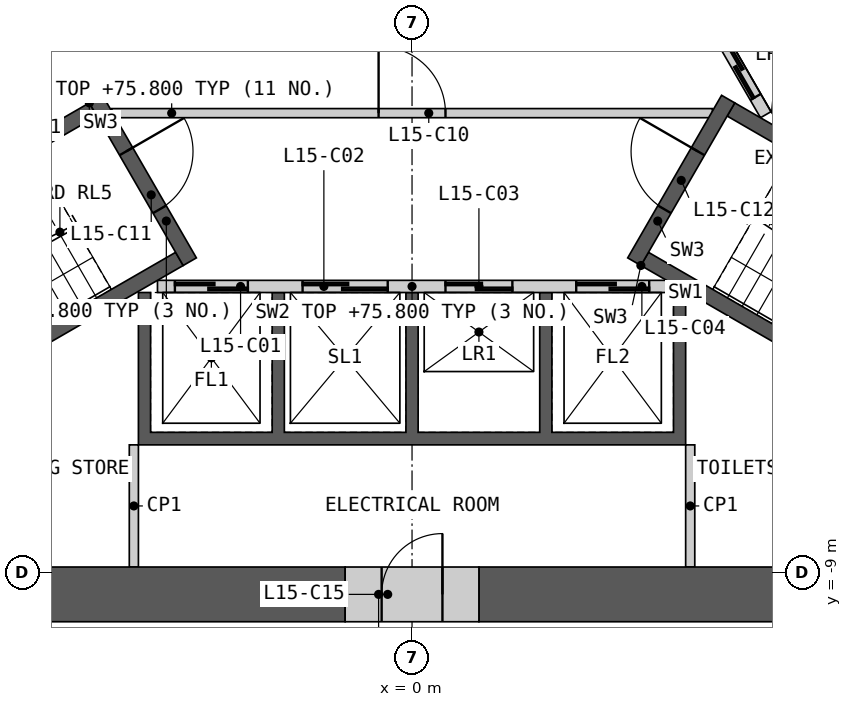
"""IFC4 building model, lengths in metres.
Left out: names, types, materials, properties, quantities, classifications, styles, units other than length and angle.
Written with IfcOpenShell. Run it as: python <this file> out.ifc"""

import sys

from ifc_helpers import new_model, si_unit, direction, frame, frame_2d, origin, place, context, subcontext, project, spatial, polyline, rectangle, outline, extrude, element, fill, save


model = new_model("IFC4")
c1 = context("Model", 3, precision=1e-05, world=origin(), true_north=direction((0.0, 1.0)))
c2 = subcontext(c1, "Body", "Model", "MODEL_VIEW")
j1 = project(units=[si_unit("LENGTHUNIT", "METRE"), si_unit("PLANEANGLEUNIT", "RADIAN")], contexts=[c1])
p1 = place(None, origin())
s1 = spatial("IfcSite", under=j1, at=p1, CompositionType="ELEMENT")
p2 = place(p1, origin())
s2 = spatial("IfcBuilding", under=s1, at=p2, CompositionType="ELEMENT")
p3 = place(p2, frame((0.0, 0.0, 72.0)))
s3 = spatial("IfcBuildingStorey", under=s2, at=p3, CompositionType="ELEMENT", Elevation=72.0)
p4 = place(p3, origin())
e1 = element("IfcWall", 1, at=p4, inside=s3, PredefinedType="SHEAR", context=c2, shape_type="SweptSolid", body=[
    extrude(outline(polyline([(4.5, -4.4), (4.5, -6.906), (-4.5, -6.906), (-4.5, -4.4), (-4.3, -4.4), (-4.3, -6.7), (-2.3, -6.7), (-2.3, -4.4), (-2.1, -4.4), (-2.1, -6.7), (-0.1, -6.7), (-0.1, -4.4), (0.1, -4.4), (0.1, -6.7), (2.1, -6.7), (2.1, -4.4), (2.3, -4.4), (2.3, -6.7), (4.3, -6.7), (4.3, -4.4), (4.5, -4.4)])), origin(), (0.0, 0.0, 1.0), 3.8),
])
p5 = place(p3, frame((-4.187, -4.3, 0.0), z_axis=(0.0, 0.0, 1.0), x_axis=(1.0, 0.0, 0.0)))
e2 = element("IfcWall", 2, at=p5, inside=s3, PredefinedType="SOLIDWALL", context=c2, shape_type="SweptSolid", body=[
    extrude(rectangle(XDim=8.373, YDim=0.2, at=frame_2d((4.187, 0.0))), origin(), (0.0, 0.0, 1.0), 3.8),
])
p6 = place(p5, frame((0.287, 0.0, 0.0)))
e3 = element("IfcOpeningElement", 3, at=p6, cuts=e2, PredefinedType="OPENING", context=c2, shape_type="SweptSolid", body=[
    extrude(rectangle(XDim=1.2, YDim=2.1, at=frame_2d((0.6, 1.05))), frame((0.0, 0.11, 0.0), z_axis=(0.0, -1.0, 0.0), x_axis=(1.0, 0.0, 0.0)), (0.0, 0.0, 1.0), 0.22),
])
p7 = place(p5, frame((2.387, 0.0, 0.0)))
e4 = element("IfcOpeningElement", 4, at=p7, cuts=e2, PredefinedType="OPENING", context=c2, shape_type="SweptSolid", body=[
    extrude(rectangle(XDim=1.4, YDim=2.1, at=frame_2d((0.7, 1.05))), frame((0.0, 0.11, 0.0), z_axis=(0.0, -1.0, 0.0), x_axis=(1.0, 0.0, 0.0)), (0.0, 0.0, 1.0), 0.22),
])
p8 = place(p5, frame((4.737, 0.0, 0.0)))
e5 = element("IfcOpeningElement", 5, at=p8, cuts=e2, PredefinedType="OPENING", context=c2, shape_type="SweptSolid", body=[
    extrude(rectangle(XDim=1.1, YDim=2.1, at=frame_2d((0.55, 1.05))), frame((0.0, 0.11, 0.0), z_axis=(0.0, -1.0, 0.0), x_axis=(1.0, 0.0, 0.0)), (0.0, 0.0, 1.0), 0.22),
])
p9 = place(p5, frame((6.887, 0.0, 0.0)))
e6 = element("IfcOpeningElement", 6, at=p9, cuts=e2, PredefinedType="OPENING", context=c2, shape_type="SweptSolid", body=[
    extrude(rectangle(XDim=1.2, YDim=2.1, at=frame_2d((0.6, 1.05))), frame((0.0, 0.11, 0.0), z_axis=(0.0, -1.0, 0.0), x_axis=(1.0, 0.0, 0.0)), (0.0, 0.0, 1.0), 0.22),
])
p10 = place(p3, origin())
e7 = element("IfcWall", 7, at=p10, inside=s3, PredefinedType="SHEAR", context=c2, shape_type="SweptSolid", body=[
    extrude(outline(polyline([(2.66, 4.192), (4.831, 5.445), (8.231, -0.444), (6.061, -1.697), (5.96, -1.524), (7.952, -0.374), (6.952, 1.358), (4.96, 0.208), (4.861, 0.381), (6.852, 1.531), (5.852, 3.263), (3.861, 2.113), (3.76, 2.287), (5.752, 3.437), (4.752, 5.169), (2.76, 4.019), (2.66, 4.192)])), origin(), (0.0, 0.0, 1.0), 3.8),
])
p11 = place(p3, frame((5.817, -1.476, 0.0), z_axis=(0.0, 0.0, 1.0), x_axis=(-0.500002616675, 0.866023893041, 0.0)))
e8 = element("IfcWall", 8, at=p11, inside=s3, PredefinedType="SOLIDWALL", context=c2, shape_type="SweptSolid", body=[
    extrude(rectangle(XDim=8.373, YDim=0.2, at=frame_2d((4.187, 0.0))), origin(), (0.0, 0.0, 1.0), 3.8),
])
p12 = place(p11, frame((0.337, 0.0, 0.0)))
e9 = element("IfcOpeningElement", 9, at=p12, cuts=e8, PredefinedType="OPENING", context=c2, shape_type="SweptSolid", body=[
    extrude(rectangle(XDim=1.1, YDim=2.1, at=frame_2d((0.55, 1.05))), frame((0.0, 0.11, 0.0), z_axis=(0.0, -1.0, 0.0), x_axis=(1.0, 0.0, 0.0)), (0.0, 0.0, 1.0), 0.22),
])
p13 = place(p11, frame((2.537, 0.0, 0.0)))
e10 = element("IfcOpeningElement", 10, at=p13, cuts=e8, PredefinedType="OPENING", context=c2, shape_type="SweptSolid", body=[
    extrude(rectangle(XDim=1.1, YDim=2.1, at=frame_2d((0.55, 1.05))), frame((0.0, 0.11, 0.0), z_axis=(0.0, -1.0, 0.0), x_axis=(1.0, 0.0, 0.0)), (0.0, 0.0, 1.0), 0.22),
])
p14 = place(p11, frame((4.737, 0.0, 0.0)))
e11 = element("IfcOpeningElement", 11, at=p14, cuts=e8, PredefinedType="OPENING", context=c2, shape_type="SweptSolid", body=[
    extrude(rectangle(XDim=1.1, YDim=2.1, at=frame_2d((0.55, 1.05))), frame((0.0, 0.11, 0.0), z_axis=(0.0, -1.0, 0.0), x_axis=(1.0, 0.0, 0.0)), (0.0, 0.0, 1.0), 0.22),
])
p15 = place(p11, frame((7.037, 0.0, 0.0)))
e12 = element("IfcOpeningElement", 12, at=p15, cuts=e8, PredefinedType="OPENING", context=c2, shape_type="SweptSolid", body=[
    extrude(rectangle(XDim=0.9, YDim=2.1, at=frame_2d((0.45, 1.05))), frame((0.0, 0.11, 0.0), z_axis=(0.0, -1.0, 0.0), x_axis=(1.0, 0.0, 0.0)), (0.0, 0.0, 1.0), 0.22),
])
p16 = place(p3, frame((-4.941, -1.45, 0.0), z_axis=(0.0, 0.0, 1.0), x_axis=(1.0, 0.0, 0.0)))
e13 = element("IfcWall", 13, at=p16, inside=s3, PredefinedType="PARTITIONING", context=c2, shape_type="SweptSolid", body=[
    extrude(rectangle(XDim=9.882, YDim=0.15, at=frame_2d((4.941, 0.0))), origin(), (0.0, 0.0, 1.0), 3.8),
])
p17 = place(p16, frame((4.391, 0.0, 0.0)))
e14 = element("IfcOpeningElement", 14, at=p17, cuts=e13, PredefinedType="OPENING", context=c2, shape_type="SweptSolid", body=[
    extrude(rectangle(XDim=1.1, YDim=2.1, at=frame_2d((0.55, 1.05))), frame((0.0, 0.085, 0.0), z_axis=(0.0, -1.0, 0.0), x_axis=(1.0, 0.0, 0.0)), (0.0, 0.0, 1.0), 0.17),
])
p18 = place(p3, origin())
e15 = element("IfcWall", 15, at=p18, inside=s3, PredefinedType="SHEAR", context=c2, shape_type="SweptSolid", body=[
    extrude(outline(polyline([(-5.307, -1.281), (-10.374, -4.206), (-10.032, -4.298), (-5.182, -1.498), (-5.307, -1.281)])), origin(), (0.0, 0.0, 1.0), 3.8),
])
p19 = place(p3, origin())
e16 = element("IfcWall", 16, at=p19, inside=s3, PredefinedType="SHEAR", context=c2, shape_type="SweptSolid", body=[
    extrude(outline(polyline([(-8.738, -6.539), (-8.83, -6.881), (-3.763, -3.956), (-3.888, -3.739), (-8.738, -6.539)])), origin(), (0.0, 0.0, 1.0), 3.8),
])
p20 = place(p3, frame((-5.199, -1.219, 0.0), z_axis=(0.0, 0.0, 1.0), x_axis=(0.499982516597, -0.866035497597, 0.0)))
e17 = element("IfcWall", 17, at=p20, inside=s3, PredefinedType="SHEAR", context=c2, shape_type="SweptSolid", body=[
    extrude(rectangle(XDim=3.088, YDim=0.25, at=frame_2d((1.544, 0.0))), origin(), (0.0, 0.0, 1.0), 3.8),
])
p21 = place(p20, frame((0.994, 0.0, 0.0)))
e18 = element("IfcOpeningElement", 18, at=p21, cuts=e17, PredefinedType="OPENING", context=c2, shape_type="SweptSolid", body=[
    extrude(rectangle(XDim=1.1, YDim=2.1, at=frame_2d((0.55, 1.05))), frame((0.0, 0.135, 0.0), z_axis=(0.0, -1.0, 0.0), x_axis=(1.0, 0.0, 0.0)), (0.0, 0.0, 1.0), 0.27),
])
p22 = place(p3, origin())
e19 = element("IfcWall", 19, at=p22, inside=s3, PredefinedType="SHEAR", context=c2, shape_type="SweptSolid", body=[
    extrude(outline(polyline([(3.763, -3.956), (8.83, -6.881), (8.738, -6.539), (3.888, -3.739), (3.763, -3.956)])), origin(), (0.0, 0.0, 1.0), 3.8),
])
p23 = place(p3, origin())
e20 = element("IfcWall", 20, at=p23, inside=s3, PredefinedType="SHEAR", context=c2, shape_type="SweptSolid", body=[
    extrude(outline(polyline([(10.032, -4.298), (10.374, -4.206), (5.307, -1.281), (5.182, -1.498), (10.032, -4.298)])), origin(), (0.0, 0.0, 1.0), 3.8),
])
p24 = place(p3, frame((3.655, -3.893, 0.0), z_axis=(0.0, 0.0, 1.0), x_axis=(0.499982516597, 0.866035497597, 0.0)))
e21 = element("IfcWall", 21, at=p24, inside=s3, PredefinedType="SHEAR", context=c2, shape_type="SweptSolid", body=[
    extrude(rectangle(XDim=3.088, YDim=0.25, at=frame_2d((1.544, 0.0))), origin(), (0.0, 0.0, 1.0), 3.8),
])
p25 = place(p24, frame((0.994, 0.0, 0.0)))
e22 = element("IfcOpeningElement", 22, at=p25, cuts=e21, PredefinedType="OPENING", context=c2, shape_type="SweptSolid", body=[
    extrude(rectangle(XDim=1.1, YDim=2.1, at=frame_2d((0.55, 1.05))), frame((0.0, 0.135, 0.0), z_axis=(0.0, -1.0, 0.0), x_axis=(1.0, 0.0, 0.0)), (0.0, 0.0, 1.0), 0.27),
])
for number, where, z_axis, x_axis in (
    (23, (4.575, -6.906, 0.0), (0.0, 0.0, 1.0), (0.0, -1.0, 0.0)),
    (24, (-4.575, -6.906, 0.0), (0.0, 0.0, 1.0), (0.0, -1.0, 0.0)),
):
    element("IfcWall", number, at=place(p3, frame(where, z_axis=z_axis, x_axis=x_axis)), inside=s3, PredefinedType="PARTITIONING", context=c2, shape_type="SweptSolid", body=[
        extrude(rectangle(XDim=2.009, YDim=0.15, at=frame_2d((1.004, 0.0))), origin(), (0.0, 0.0, 1.0), 3.8),
    ])
p26 = place(p3, frame((-11.179, -9.365, 0.0), z_axis=(0.0, 0.0, 1.0), x_axis=(1.0, 0.0, 0.0)))
e25 = element("IfcWall", 25, at=p26, inside=s3, PredefinedType="SHEAR", context=c2, shape_type="SweptSolid", body=[
    extrude(rectangle(XDim=10.079, YDim=0.9, at=frame_2d((5.04, 0.0))), origin(), (0.0, 0.0, 1.0), 3.8),
])
p27 = place(p3, frame((1.1, -9.365, 0.0), z_axis=(0.0, 0.0, 1.0), x_axis=(1.0, 0.0, 0.0)))
e26 = element("IfcWall", 26, at=p27, inside=s3, PredefinedType="SHEAR", context=c2, shape_type="SweptSolid", body=[
    extrude(rectangle(XDim=6.189, YDim=0.9, at=frame_2d((3.095, 0.0))), origin(), (0.0, 0.0, 1.0), 3.8),
])
p28 = place(p3, frame((-1.1, -9.365, 0.0), z_axis=(0.0, 0.0, 1.0), x_axis=(1.0, 0.0, 0.0)))
e27 = element("IfcWall", 27, at=p28, inside=s3, PredefinedType="SHEAR", context=c2, shape_type="SweptSolid", body=[
    extrude(rectangle(XDim=2.2, YDim=0.9, at=frame_2d((1.1, 0.0))), origin(), (0.0, 0.0, 1.0), 3.8),
])
p29 = place(p28, frame((0.6, 0.0, 0.0)))
e28 = element("IfcOpeningElement", 28, at=p29, cuts=e27, PredefinedType="OPENING", context=c2, shape_type="SweptSolid", body=[
    extrude(rectangle(XDim=1.0, YDim=2.1, at=frame_2d((0.5, 1.05))), frame((0.0, 0.46, 0.0), z_axis=(0.0, -1.0, 0.0), x_axis=(1.0, 0.0, 0.0)), (0.0, 0.0, 1.0), 0.92),
])
p30 = place(p6, origin())
e29 = element("IfcDoor", 29, at=p30, inside=s3, OperationType="SLIDING_TO_LEFT", PredefinedType="DOOR", context=c2, shape_type="SweptSolid", body=[
    extrude(rectangle(XDim=1.2, YDim=2.1, at=frame_2d((0.6, 1.05))), frame((0.0, 0.025, 0.0), z_axis=(0.0, -1.0, 0.0), x_axis=(1.0, 0.0, 0.0)), (0.0, 0.0, 1.0), 0.05),
])
fill(e3, e29)
p31 = place(p7, origin())
e30 = element("IfcDoor", 30, at=p31, inside=s3, OperationType="SLIDING_TO_LEFT", PredefinedType="DOOR", context=c2, shape_type="SweptSolid", body=[
    extrude(rectangle(XDim=1.4, YDim=2.1, at=frame_2d((0.7, 1.05))), frame((0.0, 0.025, 0.0), z_axis=(0.0, -1.0, 0.0), x_axis=(1.0, 0.0, 0.0)), (0.0, 0.0, 1.0), 0.05),
])
fill(e4, e30)
p32 = place(p8, origin())
e31 = element("IfcDoor", 31, at=p32, inside=s3, OperationType="SLIDING_TO_LEFT", PredefinedType="DOOR", context=c2, shape_type="SweptSolid", body=[
    extrude(rectangle(XDim=1.1, YDim=2.1, at=frame_2d((0.55, 1.05))), frame((0.0, 0.025, 0.0), z_axis=(0.0, -1.0, 0.0), x_axis=(1.0, 0.0, 0.0)), (0.0, 0.0, 1.0), 0.05),
])
fill(e5, e31)
p33 = place(p9, origin())
e32 = element("IfcDoor", 32, at=p33, inside=s3, OperationType="SLIDING_TO_LEFT", PredefinedType="DOOR", context=c2, shape_type="SweptSolid", body=[
    extrude(rectangle(XDim=1.2, YDim=2.1, at=frame_2d((0.6, 1.05))), frame((0.0, 0.025, 0.0), z_axis=(0.0, -1.0, 0.0), x_axis=(1.0, 0.0, 0.0)), (0.0, 0.0, 1.0), 0.05),
])
fill(e6, e32)
p34 = place(p12, origin())
e33 = element("IfcDoor", 33, at=p34, inside=s3, OperationType="SLIDING_TO_LEFT", PredefinedType="DOOR", context=c2, shape_type="SweptSolid", body=[
    extrude(rectangle(XDim=1.1, YDim=2.1, at=frame_2d((0.55, 1.05))), frame((0.0, 0.025, 0.0), z_axis=(0.0, -1.0, 0.0), x_axis=(1.0, 0.0, 0.0)), (0.0, 0.0, 1.0), 0.05),
])
fill(e9, e33)
p35 = place(p17, origin())
e34 = element("IfcDoor", 34, at=p35, inside=s3, OperationType="SINGLE_SWING_LEFT", PredefinedType="DOOR", context=c2, shape_type="SweptSolid", body=[
    extrude(rectangle(XDim=1.1, YDim=2.1, at=frame_2d((0.55, 1.05))), frame((0.0, 0.025, 0.0), z_axis=(0.0, -1.0, 0.0), x_axis=(1.0, 0.0, 0.0)), (0.0, 0.0, 1.0), 0.05),
])
fill(e14, e34)
p36 = place(p21, origin())
e35 = element("IfcDoor", 35, at=p36, inside=s3, OperationType="SINGLE_SWING_LEFT", PredefinedType="DOOR", context=c2, shape_type="SweptSolid", body=[
    extrude(rectangle(XDim=1.1, YDim=2.1, at=frame_2d((0.55, 1.05))), frame((0.0, 0.025, 0.0), z_axis=(0.0, -1.0, 0.0), x_axis=(1.0, 0.0, 0.0)), (0.0, 0.0, 1.0), 0.05),
])
fill(e18, e35)
p37 = place(p25, origin())
e36 = element("IfcDoor", 36, at=p37, inside=s3, OperationType="SINGLE_SWING_RIGHT", PredefinedType="DOOR", context=c2, shape_type="SweptSolid", body=[
    extrude(rectangle(XDim=1.1, YDim=2.1, at=frame_2d((0.55, 1.05))), frame((0.0, 0.025, 0.0), z_axis=(0.0, -1.0, 0.0), x_axis=(1.0, 0.0, 0.0)), (0.0, 0.0, 1.0), 0.05),
])
fill(e22, e36)
p38 = place(p29, origin())
e37 = element("IfcDoor", 37, at=p38, inside=s3, OperationType="SINGLE_SWING_RIGHT", PredefinedType="DOOR", context=c2, shape_type="SweptSolid", body=[
    extrude(rectangle(XDim=1.0, YDim=2.1, at=frame_2d((0.5, 1.05))), frame((0.0, 0.205, 0.0), z_axis=(0.0, -1.0, 0.0), x_axis=(1.0, 0.0, 0.0)), (0.0, 0.0, 1.0), 0.05),
])
fill(e28, e37)
save(model, sys.argv[1])
